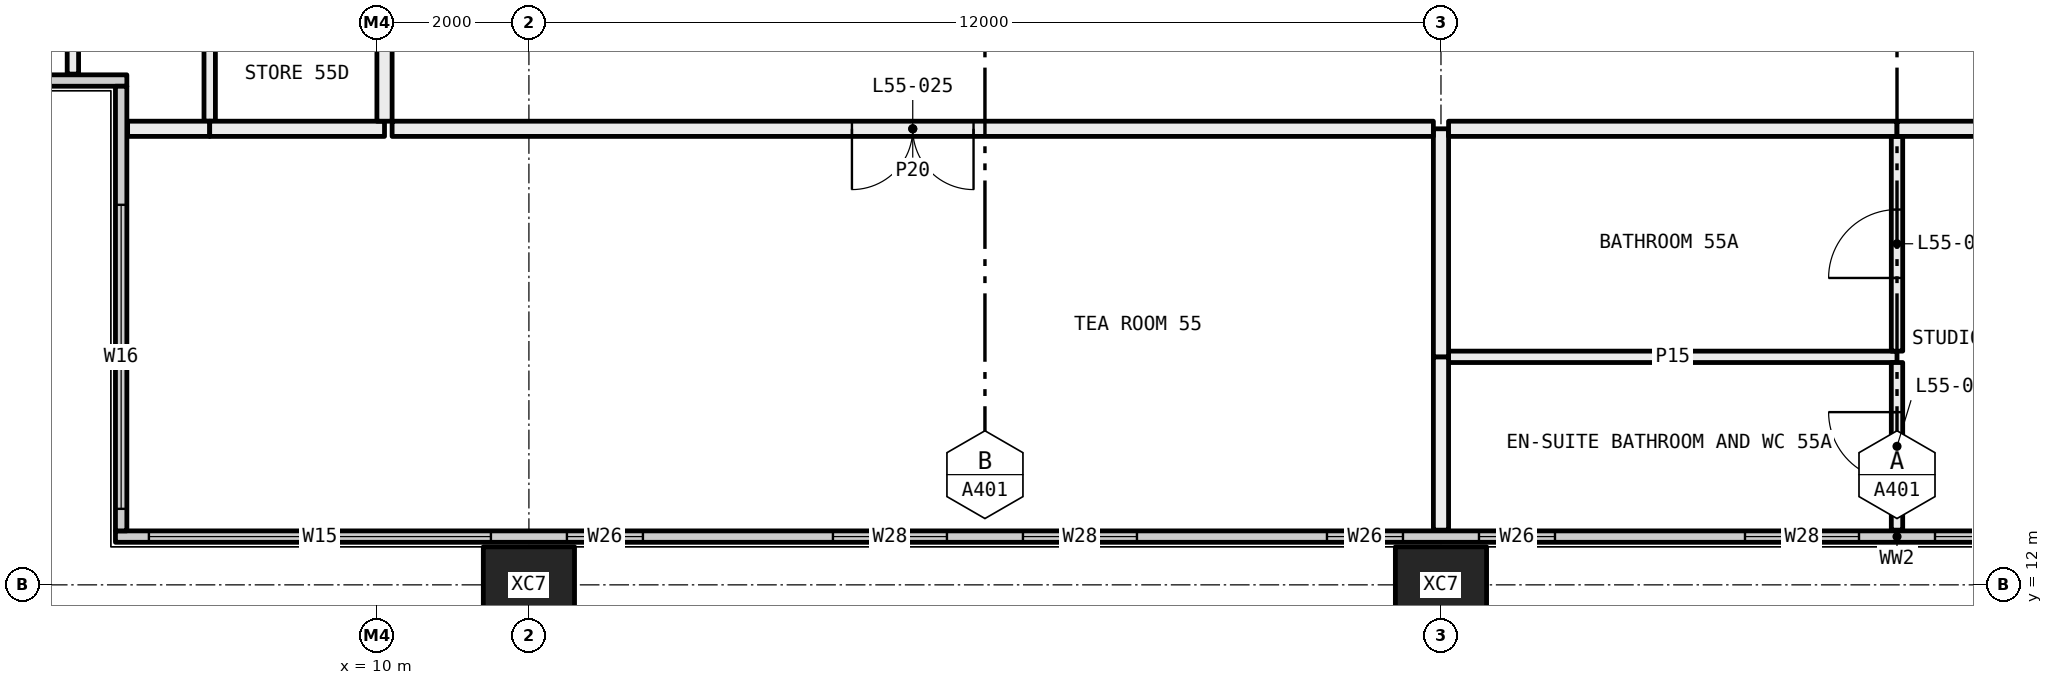
"""IFC4 building model, lengths in metres.
Left out: names, types, materials, properties, quantities, classifications, styles, units other than length and angle.
Written with IfcOpenShell. Run it as: python <this file> out.ifc"""

import sys

from ifc_helpers import new_model, si_unit, direction, frame, frame_2d, origin, origin_2d, place, context, subcontext, project, spatial, rectangle, hollow_rectangle, extrude, element, fill, save


model = new_model("IFC4")
c1 = context("Model", 3, precision=1e-05, world=origin(), true_north=direction((0.0, 1.0)))
c2 = subcontext(c1, "Body", "Model", "MODEL_VIEW")
j1 = project(units=[si_unit("LENGTHUNIT", "METRE"), si_unit("PLANEANGLEUNIT", "RADIAN")], contexts=[c1])
p1 = place(None, origin())
s1 = spatial("IfcSite", under=j1, at=p1, CompositionType="ELEMENT")
p2 = place(p1, origin())
s2 = spatial("IfcBuilding", under=s1, at=p2, CompositionType="ELEMENT")
p3 = place(p2, frame((0.0, 0.0, 206.55)))
s3 = spatial("IfcBuildingStorey", under=s2, at=p3, CompositionType="ELEMENT", Elevation=206.55)
for number, where, z_axis, x_axis in (
    (1, (12.0, 12.0, -0.4), (0.0, 0.0, 1.0), (1.0, 0.0, 0.0)),
    (2, (24.0, 12.0, -0.4), (0.0, 0.0, 1.0), (1.0, 0.0, 0.0)),
):
    element("IfcColumn", number, at=place(p3, frame(where, z_axis=z_axis, x_axis=x_axis)), inside=s3, PredefinedType="COLUMN", context=c2, shape_type="SweptSolid", body=[
        extrude(hollow_rectangle(XDim=1.2, YDim=1.0, WallThickness=0.045, at=origin_2d()), origin(), (0.0, 0.0, 1.0), 3.45),
    ])
p4 = place(p3, frame((6.56, 12.635, 0.0), z_axis=(0.0, 0.0, 1.0), x_axis=(1.0, 0.0, 0.0)))
e3 = element("IfcWall", 3, at=p4, inside=s3, PredefinedType="ELEMENTEDWALL", context=c2, shape_type="SweptSolid", body=[
    extrude(rectangle(XDim=46.88, YDim=0.15, at=frame_2d((23.44, 0.0))), origin(), (0.0, 0.0, 1.0), 3.05),
])
p5 = place(p4, frame((0.44, 0.0, 0.45)))
e4 = element("IfcOpeningElement", 4, at=p5, cuts=e3, PredefinedType="OPENING", context=c2, shape_type="SweptSolid", body=[
    extrude(rectangle(XDim=4.5, YDim=2.55, at=frame_2d((2.25, 1.275))), frame((0.0, 0.085, 0.0), z_axis=(0.0, -1.0, 0.0), x_axis=(1.0, 0.0, 0.0)), (0.0, 0.0, 1.0), 0.17),
])
p6 = place(p4, frame((5.94, 0.0, 0.45)))
e5 = element("IfcOpeningElement", 5, at=p6, cuts=e3, PredefinedType="OPENING", context=c2, shape_type="SweptSolid", body=[
    extrude(rectangle(XDim=1.0, YDim=2.55, at=frame_2d((0.5, 1.275))), frame((0.0, 0.085, 0.0), z_axis=(0.0, -1.0, 0.0), x_axis=(1.0, 0.0, 0.0)), (0.0, 0.0, 1.0), 0.17),
])
p7 = place(p4, frame((9.44, 0.0, 0.45)))
e6 = element("IfcOpeningElement", 6, at=p7, cuts=e3, PredefinedType="OPENING", context=c2, shape_type="SweptSolid", body=[
    extrude(rectangle(XDim=1.5, YDim=2.55, at=frame_2d((0.75, 1.275))), frame((0.0, 0.085, 0.0), z_axis=(0.0, -1.0, 0.0), x_axis=(1.0, 0.0, 0.0)), (0.0, 0.0, 1.0), 0.17),
])
p8 = place(p4, frame((11.94, 0.0, 0.45)))
e7 = element("IfcOpeningElement", 7, at=p8, cuts=e3, PredefinedType="OPENING", context=c2, shape_type="SweptSolid", body=[
    extrude(rectangle(XDim=1.5, YDim=2.55, at=frame_2d((0.75, 1.275))), frame((0.0, 0.085, 0.0), z_axis=(0.0, -1.0, 0.0), x_axis=(1.0, 0.0, 0.0)), (0.0, 0.0, 1.0), 0.17),
])
p9 = place(p4, frame((15.94, 0.0, 0.45)))
e8 = element("IfcOpeningElement", 8, at=p9, cuts=e3, PredefinedType="OPENING", context=c2, shape_type="SweptSolid", body=[
    extrude(rectangle(XDim=1.0, YDim=2.55, at=frame_2d((0.5, 1.275))), frame((0.0, 0.085, 0.0), z_axis=(0.0, -1.0, 0.0), x_axis=(1.0, 0.0, 0.0)), (0.0, 0.0, 1.0), 0.17),
])
p10 = place(p4, frame((17.94, 0.0, 0.45)))
e9 = element("IfcOpeningElement", 9, at=p10, cuts=e3, PredefinedType="OPENING", context=c2, shape_type="SweptSolid", body=[
    extrude(rectangle(XDim=1.0, YDim=2.55, at=frame_2d((0.5, 1.275))), frame((0.0, 0.085, 0.0), z_axis=(0.0, -1.0, 0.0), x_axis=(1.0, 0.0, 0.0)), (0.0, 0.0, 1.0), 0.17),
])
p11 = place(p4, frame((21.44, 0.0, 0.45)))
e10 = element("IfcOpeningElement", 10, at=p11, cuts=e3, PredefinedType="OPENING", context=c2, shape_type="SweptSolid", body=[
    extrude(rectangle(XDim=1.5, YDim=2.55, at=frame_2d((0.75, 1.275))), frame((0.0, 0.085, 0.0), z_axis=(0.0, -1.0, 0.0), x_axis=(1.0, 0.0, 0.0)), (0.0, 0.0, 1.0), 0.17),
])
p12 = place(p4, frame((23.94, 0.0, 0.45)))
e11 = element("IfcOpeningElement", 11, at=p12, cuts=e3, PredefinedType="OPENING", context=c2, shape_type="SweptSolid", body=[
    extrude(rectangle(XDim=1.5, YDim=2.55, at=frame_2d((0.75, 1.275))), frame((0.0, 0.085, 0.0), z_axis=(0.0, -1.0, 0.0), x_axis=(1.0, 0.0, 0.0)), (0.0, 0.0, 1.0), 0.17),
])
p13 = place(p4, frame((27.94, 0.0, 0.45)))
e12 = element("IfcOpeningElement", 12, at=p13, cuts=e3, PredefinedType="OPENING", context=c2, shape_type="SweptSolid", body=[
    extrude(rectangle(XDim=1.0, YDim=2.55, at=frame_2d((0.5, 1.275))), frame((0.0, 0.085, 0.0), z_axis=(0.0, -1.0, 0.0), x_axis=(1.0, 0.0, 0.0)), (0.0, 0.0, 1.0), 0.17),
])
p14 = place(p4, frame((29.94, 0.0, 0.45)))
e13 = element("IfcOpeningElement", 13, at=p14, cuts=e3, PredefinedType="OPENING", context=c2, shape_type="SweptSolid", body=[
    extrude(rectangle(XDim=1.0, YDim=2.55, at=frame_2d((0.5, 1.275))), frame((0.0, 0.085, 0.0), z_axis=(0.0, -1.0, 0.0), x_axis=(1.0, 0.0, 0.0)), (0.0, 0.0, 1.0), 0.17),
])
p15 = place(p4, frame((33.44, 0.0, 0.45)))
e14 = element("IfcOpeningElement", 14, at=p15, cuts=e3, PredefinedType="OPENING", context=c2, shape_type="SweptSolid", body=[
    extrude(rectangle(XDim=1.5, YDim=2.55, at=frame_2d((0.75, 1.275))), frame((0.0, 0.085, 0.0), z_axis=(0.0, -1.0, 0.0), x_axis=(1.0, 0.0, 0.0)), (0.0, 0.0, 1.0), 0.17),
])
p16 = place(p4, frame((35.94, 0.0, 0.45)))
e15 = element("IfcOpeningElement", 15, at=p16, cuts=e3, PredefinedType="OPENING", context=c2, shape_type="SweptSolid", body=[
    extrude(rectangle(XDim=1.5, YDim=2.55, at=frame_2d((0.75, 1.275))), frame((0.0, 0.085, 0.0), z_axis=(0.0, -1.0, 0.0), x_axis=(1.0, 0.0, 0.0)), (0.0, 0.0, 1.0), 0.17),
])
p17 = place(p4, frame((39.94, 0.0, 0.45)))
e16 = element("IfcOpeningElement", 16, at=p17, cuts=e3, PredefinedType="OPENING", context=c2, shape_type="SweptSolid", body=[
    extrude(rectangle(XDim=1.0, YDim=2.55, at=frame_2d((0.5, 1.275))), frame((0.0, 0.085, 0.0), z_axis=(0.0, -1.0, 0.0), x_axis=(1.0, 0.0, 0.0)), (0.0, 0.0, 1.0), 0.17),
])
p18 = place(p4, frame((41.94, 0.0, 0.45)))
e17 = element("IfcOpeningElement", 17, at=p18, cuts=e3, PredefinedType="OPENING", context=c2, shape_type="SweptSolid", body=[
    extrude(rectangle(XDim=4.5, YDim=2.55, at=frame_2d((2.25, 1.275))), frame((0.0, 0.085, 0.0), z_axis=(0.0, -1.0, 0.0), x_axis=(1.0, 0.0, 0.0)), (0.0, 0.0, 1.0), 0.17),
])
p19 = place(p3, frame((0.56, 18.635, 0.0), z_axis=(0.0, 0.0, 1.0), x_axis=(1.0, 0.0, 0.0)))
e18 = element("IfcWall", 18, at=p19, inside=s3, PredefinedType="ELEMENTEDWALL", context=c2, shape_type="SweptSolid", body=[
    extrude(rectangle(XDim=6.15, YDim=0.15, at=frame_2d((3.075, 0.0))), origin(), (0.0, 0.0, 1.0), 3.05),
])
p20 = place(p19, frame((0.44, 0.0, 0.45)))
e19 = element("IfcOpeningElement", 19, at=p20, cuts=e18, PredefinedType="OPENING", context=c2, shape_type="SweptSolid", body=[
    extrude(rectangle(XDim=4.0, YDim=2.55, at=frame_2d((2.0, 1.275))), frame((0.0, 0.085, 0.0), z_axis=(0.0, -1.0, 0.0), x_axis=(1.0, 0.0, 0.0)), (0.0, 0.0, 1.0), 0.17),
])
p21 = place(p3, frame((6.635, 12.71, 0.0), z_axis=(0.0, 0.0, 1.0), x_axis=(0.0, 1.0, 0.0)))
e20 = element("IfcWall", 20, at=p21, inside=s3, PredefinedType="ELEMENTEDWALL", context=c2, shape_type="SweptSolid", body=[
    extrude(rectangle(XDim=5.85, YDim=0.15, at=frame_2d((2.925, 0.0))), origin(), (0.0, 0.0, 1.0), 3.05),
])
p22 = place(p21, frame((0.29, 0.0, 0.45)))
e21 = element("IfcOpeningElement", 21, at=p22, cuts=e20, PredefinedType="OPENING", context=c2, shape_type="SweptSolid", body=[
    extrude(rectangle(XDim=4.0, YDim=2.55, at=frame_2d((2.0, 1.275))), frame((0.0, 0.085, 0.0), z_axis=(0.0, -1.0, 0.0), x_axis=(1.0, 0.0, 0.0)), (0.0, 0.0, 1.0), 0.17),
])
p23 = place(p3, frame((30.0, 15.0, 0.0), z_axis=(0.0, 0.0, 1.0), x_axis=(-1.0, 0.0, 0.0)))
e22 = element("IfcWall", 22, at=p23, inside=s3, PredefinedType="PARTITIONING", context=c2, shape_type="SweptSolid", body=[
    extrude(rectangle(XDim=5.9, YDim=0.15, at=frame_2d((2.95, 0.0))), origin(), (0.0, 0.0, 1.0), 3.05),
])
p24 = place(p3, frame((30.0, 12.72, 0.0), z_axis=(0.0, 0.0, 1.0), x_axis=(0.0, 1.0, 0.0)))
e23 = element("IfcWall", 23, at=p24, inside=s3, PredefinedType="PARTITIONING", context=c2, shape_type="SweptSolid", body=[
    extrude(rectangle(XDim=2.205, YDim=0.15, at=frame_2d((1.103, 0.0))), origin(), (0.0, 0.0, 1.0), 3.05),
])
p25 = place(p24, frame((0.653, 0.0, 0.0)))
e24 = element("IfcOpeningElement", 24, at=p25, cuts=e23, PredefinedType="OPENING", context=c2, shape_type="SweptSolid", body=[
    extrude(rectangle(XDim=0.9, YDim=2.1, at=frame_2d((0.45, 1.05))), frame((0.0, 0.085, 0.0), z_axis=(0.0, -1.0, 0.0), x_axis=(1.0, 0.0, 0.0)), (0.0, 0.0, 1.0), 0.17),
])
p26 = place(p3, frame((24.0, 15.0, 0.0), z_axis=(0.0, 0.0, 1.0), x_axis=(0.0, -1.0, 0.0)))
e25 = element("IfcWall", 25, at=p26, inside=s3, PredefinedType="PARTITIONING", context=c2, shape_type="SweptSolid", body=[
    extrude(rectangle(XDim=2.28, YDim=0.2, at=frame_2d((1.14, 0.0))), origin(), (0.0, 0.0, 1.0), 3.05),
])
p27 = place(p3, frame((30.0, 15.075, 0.0), z_axis=(0.0, 0.0, 1.0), x_axis=(0.0, 1.0, 0.0)))
e26 = element("IfcWall", 26, at=p27, inside=s3, PredefinedType="PARTITIONING", context=c2, shape_type="SweptSolid", body=[
    extrude(rectangle(XDim=2.825, YDim=0.15, at=frame_2d((1.413, 0.0))), origin(), (0.0, 0.0, 1.0), 3.05),
])
p28 = place(p27, frame((0.962, 0.0, 0.0)))
e27 = element("IfcOpeningElement", 27, at=p28, cuts=e26, PredefinedType="OPENING", context=c2, shape_type="SweptSolid", body=[
    extrude(rectangle(XDim=0.9, YDim=2.1, at=frame_2d((0.45, 1.05))), frame((0.0, 0.085, 0.0), z_axis=(0.0, -1.0, 0.0), x_axis=(1.0, 0.0, 0.0)), (0.0, 0.0, 1.0), 0.17),
])
p29 = place(p3, frame((24.0, 18.0, 0.0), z_axis=(0.0, 0.0, 1.0), x_axis=(0.0, -1.0, 0.0)))
e28 = element("IfcWall", 28, at=p29, inside=s3, PredefinedType="PARTITIONING", context=c2, shape_type="SweptSolid", body=[
    extrude(rectangle(XDim=3.0, YDim=0.2, at=frame_2d((1.5, 0.0))), origin(), (0.0, 0.0, 1.0), 3.05),
])
p30 = place(p3, frame((30.0, 18.0, 0.0), z_axis=(0.0, 0.0, 1.0), x_axis=(-1.0, 0.0, 0.0)))
e29 = element("IfcWall", 29, at=p30, inside=s3, PredefinedType="PARTITIONING", context=c2, shape_type="SweptSolid", body=[
    extrude(rectangle(XDim=5.9, YDim=0.2, at=frame_2d((2.95, 0.0))), origin(), (0.0, 0.0, 1.0), 3.05),
])
p31 = place(p3, frame((36.0, 18.0, 0.0), z_axis=(0.0, 0.0, 1.0), x_axis=(-1.0, 0.0, 0.0)))
e30 = element("IfcWall", 30, at=p31, inside=s3, PredefinedType="PARTITIONING", context=c2, shape_type="SweptSolid", body=[
    extrude(rectangle(XDim=6.0, YDim=0.2, at=frame_2d((3.0, 0.0))), origin(), (0.0, 0.0, 1.0), 2.45),
])
p32 = place(p3, frame((6.0, 18.72, 0.0), z_axis=(0.0, 0.0, 1.0), x_axis=(0.0, 1.0, 0.0)))
e31 = element("IfcWall", 31, at=p32, inside=s3, PredefinedType="PARTITIONING", context=c2, shape_type="SweptSolid", body=[
    extrude(rectangle(XDim=2.28, YDim=0.15, at=frame_2d((1.14, 0.0))), origin(), (0.0, 0.0, 1.0), 3.05),
])
p33 = place(p3, frame((7.8, 18.1, 0.0), z_axis=(0.0, 0.0, 1.0), x_axis=(0.0, 1.0, 0.0)))
e32 = element("IfcWall", 32, at=p33, inside=s3, PredefinedType="PARTITIONING", context=c2, shape_type="SweptSolid", body=[
    extrude(rectangle(XDim=2.9, YDim=0.15, at=frame_2d((1.45, 0.0))), origin(), (0.0, 0.0, 1.0), 3.05),
])
p34 = place(p3, frame((6.72, 18.0, 0.0), z_axis=(0.0, 0.0, 1.0), x_axis=(1.0, 0.0, 0.0)))
e33 = element("IfcWall", 33, at=p34, inside=s3, PredefinedType="PARTITIONING", context=c2, shape_type="SweptSolid", body=[
    extrude(rectangle(XDim=1.08, YDim=0.2, at=frame_2d((0.54, 0.0))), origin(), (0.0, 0.0, 1.0), 3.05),
])
p35 = place(p3, frame((7.8, 18.0, 0.0), z_axis=(0.0, 0.0, 1.0), x_axis=(1.0, 0.0, 0.0)))
e34 = element("IfcWall", 34, at=p35, inside=s3, PredefinedType="PARTITIONING", context=c2, shape_type="SweptSolid", body=[
    extrude(rectangle(XDim=2.3, YDim=0.2, at=frame_2d((1.15, 0.0))), origin(), (0.0, 0.0, 1.0), 3.05),
])
p36 = place(p3, frame((10.1, 18.1, 0.0), z_axis=(0.0, 0.0, 1.0), x_axis=(0.0, 1.0, 0.0)))
e35 = element("IfcWall", 35, at=p36, inside=s3, PredefinedType="PARTITIONING", context=c2, shape_type="SweptSolid", body=[
    extrude(rectangle(XDim=2.9, YDim=0.2, at=frame_2d((1.45, 0.0))), origin(), (0.0, 0.0, 1.0), 3.05),
])
p37 = place(p3, frame((23.9, 18.0, 0.0), z_axis=(0.0, 0.0, 1.0), x_axis=(-1.0, 0.0, 0.0)))
e36 = element("IfcWall", 36, at=p37, inside=s3, PredefinedType="PARTITIONING", context=c2, shape_type="SweptSolid", body=[
    extrude(rectangle(XDim=13.7, YDim=0.2, at=frame_2d((6.85, 0.0))), origin(), (0.0, 0.0, 1.0), 3.05),
])
p38 = place(p37, frame((6.05, 0.0, 0.0)))
e37 = element("IfcOpeningElement", 37, at=p38, cuts=e36, PredefinedType="OPENING", context=c2, shape_type="SweptSolid", body=[
    extrude(rectangle(XDim=1.6, YDim=2.1, at=frame_2d((0.8, 1.05))), frame((0.0, 0.11, 0.0), z_axis=(0.0, -1.0, 0.0), x_axis=(1.0, 0.0, 0.0)), (0.0, 0.0, 1.0), 0.22),
])
p39 = place(p5, origin())
e38 = element("IfcWindow", 38, at=p39, inside=s3, PartitioningType="SINGLE_PANEL", PredefinedType="WINDOW", context=c2, shape_type="SweptSolid", body=[
    extrude(rectangle(XDim=4.5, YDim=2.55, at=frame_2d((2.25, 1.275))), frame((0.0, 0.03, 0.0), z_axis=(0.0, -1.0, 0.0), x_axis=(1.0, 0.0, 0.0)), (0.0, 0.0, 1.0), 0.06),
])
fill(e4, e38)
p40 = place(p6, origin())
e39 = element("IfcWindow", 39, at=p40, inside=s3, PartitioningType="SINGLE_PANEL", PredefinedType="WINDOW", context=c2, shape_type="SweptSolid", body=[
    extrude(rectangle(XDim=1.0, YDim=2.55, at=frame_2d((0.5, 1.275))), frame((0.0, 0.03, 0.0), z_axis=(0.0, -1.0, 0.0), x_axis=(1.0, 0.0, 0.0)), (0.0, 0.0, 1.0), 0.06),
])
fill(e5, e39)
p41 = place(p7, origin())
e40 = element("IfcWindow", 40, at=p41, inside=s3, PartitioningType="SINGLE_PANEL", PredefinedType="WINDOW", context=c2, shape_type="SweptSolid", body=[
    extrude(rectangle(XDim=1.5, YDim=2.55, at=frame_2d((0.75, 1.275))), frame((0.0, 0.03, 0.0), z_axis=(0.0, -1.0, 0.0), x_axis=(1.0, 0.0, 0.0)), (0.0, 0.0, 1.0), 0.06),
])
fill(e6, e40)
p42 = place(p8, origin())
e41 = element("IfcWindow", 41, at=p42, inside=s3, PartitioningType="SINGLE_PANEL", PredefinedType="WINDOW", context=c2, shape_type="SweptSolid", body=[
    extrude(rectangle(XDim=1.5, YDim=2.55, at=frame_2d((0.75, 1.275))), frame((0.0, 0.03, 0.0), z_axis=(0.0, -1.0, 0.0), x_axis=(1.0, 0.0, 0.0)), (0.0, 0.0, 1.0), 0.06),
])
fill(e7, e41)
p43 = place(p9, origin())
e42 = element("IfcWindow", 42, at=p43, inside=s3, PartitioningType="SINGLE_PANEL", PredefinedType="WINDOW", context=c2, shape_type="SweptSolid", body=[
    extrude(rectangle(XDim=1.0, YDim=2.55, at=frame_2d((0.5, 1.275))), frame((0.0, 0.03, 0.0), z_axis=(0.0, -1.0, 0.0), x_axis=(1.0, 0.0, 0.0)), (0.0, 0.0, 1.0), 0.06),
])
fill(e8, e42)
p44 = place(p10, origin())
e43 = element("IfcWindow", 43, at=p44, inside=s3, PartitioningType="SINGLE_PANEL", PredefinedType="WINDOW", context=c2, shape_type="SweptSolid", body=[
    extrude(rectangle(XDim=1.0, YDim=2.55, at=frame_2d((0.5, 1.275))), frame((0.0, 0.03, 0.0), z_axis=(0.0, -1.0, 0.0), x_axis=(1.0, 0.0, 0.0)), (0.0, 0.0, 1.0), 0.06),
])
fill(e9, e43)
p45 = place(p11, origin())
e44 = element("IfcWindow", 44, at=p45, inside=s3, PartitioningType="SINGLE_PANEL", PredefinedType="WINDOW", context=c2, shape_type="SweptSolid", body=[
    extrude(rectangle(XDim=1.5, YDim=2.55, at=frame_2d((0.75, 1.275))), frame((0.0, 0.03, 0.0), z_axis=(0.0, -1.0, 0.0), x_axis=(1.0, 0.0, 0.0)), (0.0, 0.0, 1.0), 0.06),
])
fill(e10, e44)
p46 = place(p12, origin())
e45 = element("IfcWindow", 45, at=p46, inside=s3, PartitioningType="SINGLE_PANEL", PredefinedType="WINDOW", context=c2, shape_type="SweptSolid", body=[
    extrude(rectangle(XDim=1.5, YDim=2.55, at=frame_2d((0.75, 1.275))), frame((0.0, 0.03, 0.0), z_axis=(0.0, -1.0, 0.0), x_axis=(1.0, 0.0, 0.0)), (0.0, 0.0, 1.0), 0.06),
])
fill(e11, e45)
p47 = place(p22, origin())
e46 = element("IfcWindow", 46, at=p47, inside=s3, PartitioningType="SINGLE_PANEL", PredefinedType="WINDOW", context=c2, shape_type="SweptSolid", body=[
    extrude(rectangle(XDim=4.0, YDim=2.55, at=frame_2d((2.0, 1.275))), frame((0.0, 0.03, 0.0), z_axis=(0.0, -1.0, 0.0), x_axis=(1.0, 0.0, 0.0)), (0.0, 0.0, 1.0), 0.06),
])
fill(e21, e46)
p48 = place(p25, origin())
e47 = element("IfcDoor", 47, at=p48, inside=s3, OperationType="SINGLE_SWING_LEFT", PredefinedType="DOOR", context=c2, shape_type="SweptSolid", body=[
    extrude(rectangle(XDim=0.9, YDim=2.1, at=frame_2d((0.45, 1.05))), frame((0.0, 0.025, 0.0), z_axis=(0.0, -1.0, 0.0), x_axis=(1.0, 0.0, 0.0)), (0.0, 0.0, 1.0), 0.05),
])
fill(e24, e47)
p49 = place(p28, origin())
e48 = element("IfcDoor", 48, at=p49, inside=s3, OperationType="SINGLE_SWING_RIGHT", PredefinedType="DOOR", context=c2, shape_type="SweptSolid", body=[
    extrude(rectangle(XDim=0.9, YDim=2.1, at=frame_2d((0.45, 1.05))), frame((0.0, 0.025, 0.0), z_axis=(0.0, -1.0, 0.0), x_axis=(1.0, 0.0, 0.0)), (0.0, 0.0, 1.0), 0.05),
])
fill(e27, e48)
p50 = place(p38, origin())
e49 = element("IfcDoor", 49, at=p50, inside=s3, OperationType="DOUBLE_DOOR_SINGLE_SWING", PredefinedType="DOOR", context=c2, shape_type="SweptSolid", body=[
    extrude(rectangle(XDim=1.6, YDim=2.1, at=frame_2d((0.8, 1.05))), frame((0.0, 0.025, 0.0), z_axis=(0.0, -1.0, 0.0), x_axis=(1.0, 0.0, 0.0)), (0.0, 0.0, 1.0), 0.05),
])
fill(e37, e49)
save(model, sys.argv[1])
